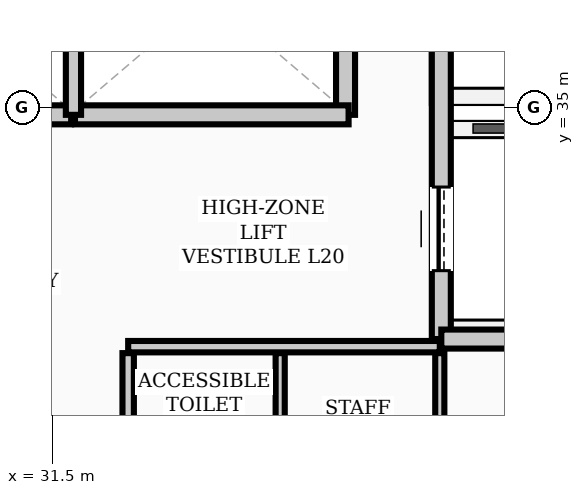
"""IFC4 building model, lengths in metres.
Left out: names, types, materials, properties, quantities, classifications, styles, units other than length and angle.
Written with IfcOpenShell. Run it as: python <this file> out.ifc"""

import sys

from ifc_helpers import new_model, si_unit, direction, frame, frame_2d, origin, place, context, subcontext, project, spatial, rectangle, extrude, element, fill, save


model = new_model("IFC4")
c1 = context("Model", 3, precision=1e-05, world=origin(), true_north=direction((0.0, 1.0)))
c2 = subcontext(c1, "Body", "Model", "MODEL_VIEW")
j1 = project(units=[si_unit("LENGTHUNIT", "METRE"), si_unit("PLANEANGLEUNIT", "RADIAN")], contexts=[c1])
p1 = place(None, origin())
s1 = spatial("IfcSite", under=j1, at=p1, CompositionType="ELEMENT")
p2 = place(p1, origin())
s2 = spatial("IfcBuilding", under=s1, at=p2, CompositionType="ELEMENT")
p3 = place(p2, frame((0.0, 0.0, 81.1)))
s3 = spatial("IfcBuildingStorey", under=s2, at=p3, CompositionType="ELEMENT", Elevation=81.1)
p4 = place(p3, frame((36.62, 31.95, 0.0), z_axis=(0.0, 0.0, 1.0), x_axis=(0.0, 1.0, 0.0)))
e1 = element("IfcWall", 1, at=p4, inside=s3, PredefinedType="STANDARD", context=c2, shape_type="SweptSolid", body=[
    extrude(rectangle(XDim=6.0, YDim=0.25, at=frame_2d((3.0, 0.0))), origin(), (0.0, 0.0, 1.0), 3.3),
])
p5 = place(p4, frame((0.9, 0.0, 0.0)))
e2 = element("IfcOpeningElement", 2, at=p5, cuts=e1, PredefinedType="OPENING", context=c2, shape_type="SweptSolid", body=[
    extrude(rectangle(XDim=1.1, YDim=2.08, at=frame_2d((0.55, 1.04))), frame((0.0, 0.135, 0.0), z_axis=(0.0, -1.0, 0.0), x_axis=(1.0, 0.0, 0.0)), (0.0, 0.0, 1.0), 0.27),
])
p6 = place(p4, frame((4.0, 0.0, 0.0)))
e3 = element("IfcOpeningElement", 3, at=p6, cuts=e1, PredefinedType="OPENING", context=c2, shape_type="SweptSolid", body=[
    extrude(rectangle(XDim=1.1, YDim=2.08, at=frame_2d((0.55, 1.04))), frame((0.0, 0.135, 0.0), z_axis=(0.0, -1.0, 0.0), x_axis=(1.0, 0.0, 0.0)), (0.0, 0.0, 1.0), 0.27),
])
p7 = place(p3, frame((36.62, 31.95, 0.0), z_axis=(0.0, 0.0, 1.0), x_axis=(1.0, 0.0, 0.0)))
e4 = element("IfcWall", 4, at=p7, inside=s3, PredefinedType="STANDARD", context=c2, shape_type="SweptSolid", body=[
    extrude(rectangle(XDim=1.9, YDim=0.25, at=frame_2d((0.95, 0.0))), origin(), (0.0, 0.0, 1.0), 3.48),
])
p8 = place(p3, frame((35.36, 34.9, 0.0), z_axis=(0.0, 0.0, 1.0), x_axis=(0.0, 1.0, 0.0)))
e5 = element("IfcWall", 5, at=p8, inside=s3, PredefinedType="STANDARD", context=c2, shape_type="SweptSolid", body=[
    extrude(rectangle(XDim=3.05, YDim=0.25, at=frame_2d((1.525, 0.0))), origin(), (0.0, 0.0, 1.0), 3.3),
])
p9 = place(p3, frame((28.2, 34.9, 0.0), z_axis=(0.0, 0.0, 1.0), x_axis=(1.0, 0.0, 0.0)))
e6 = element("IfcWall", 6, at=p9, inside=s3, PredefinedType="STANDARD", context=c2, shape_type="SweptSolid", body=[
    extrude(rectangle(XDim=3.55, YDim=0.25, at=frame_2d((1.775, 0.0))), origin(), (0.0, 0.0, 1.0), 3.72),
])
p10 = place(p3, frame((31.8, 34.9, 0.0), z_axis=(0.0, 0.0, 1.0), x_axis=(1.0, 0.0, 0.0)))
e7 = element("IfcWall", 7, at=p10, inside=s3, PredefinedType="STANDARD", context=c2, shape_type="SweptSolid", body=[
    extrude(rectangle(XDim=3.6, YDim=0.25, at=frame_2d((1.8, 0.0))), origin(), (0.0, 0.0, 1.0), 3.72),
])
p11 = place(p3, frame((32.5, 31.85, 0.0), z_axis=(0.0, 0.0, 1.0), x_axis=(1.0, 0.0, 0.0)))
e8 = element("IfcWall", 8, at=p11, inside=s3, PredefinedType="PARTITIONING", context=c2, shape_type="SweptSolid", body=[
    extrude(rectangle(XDim=4.1, YDim=0.15, at=frame_2d((2.05, 0.0))), origin(), (0.0, 0.0, 1.0), 3.72),
])
p12 = place(p3, frame((32.5, 29.285, 0.0), z_axis=(0.0, 0.0, 1.0), x_axis=(0.0, 1.0, 0.0)))
e9 = element("IfcWall", 9, at=p12, inside=s3, PredefinedType="PARTITIONING", context=c2, shape_type="SweptSolid", body=[
    extrude(rectangle(XDim=2.48, YDim=0.15, at=frame_2d((1.24, 0.0))), origin(), (0.0, 0.0, 1.0), 3.3),
])
for number, where, z_axis, x_axis in (
    (10, (36.6, 29.285, 0.0), (0.0, 0.0, 1.0), (0.0, 1.0, 0.0)),
    (11, (34.5, 29.285, 0.0), (0.0, 0.0, 1.0), (0.0, 1.0, 0.0)),
):
    element("IfcWall", number, at=place(p3, frame(where, z_axis=z_axis, x_axis=x_axis)), inside=s3, PredefinedType="PARTITIONING", context=c2, shape_type="SweptSolid", body=[
        extrude(rectangle(XDim=2.48, YDim=0.12, at=frame_2d((1.24, 0.0))), origin(), (0.0, 0.0, 1.0), 3.3),
    ])
p13 = place(p3, frame((31.78, 34.9, 0.0), z_axis=(0.0, 0.0, 1.0), x_axis=(0.0, 1.0, 0.0)))
e12 = element("IfcWall", 12, at=p13, inside=s3, PredefinedType="STANDARD", context=c2, shape_type="SweptSolid", body=[
    extrude(rectangle(XDim=3.12, YDim=0.2, at=frame_2d((1.56, 0.0))), origin(), (0.0, 0.0, 1.0), 3.3),
])
p14 = place(p5, origin())
e13 = element("IfcDoor", 13, at=p14, inside=s3, OperationType="SLIDING_TO_LEFT", PredefinedType="DOOR", context=c2, shape_type="SweptSolid", body=[
    extrude(rectangle(XDim=1.1, YDim=2.08, at=frame_2d((0.55, 1.04))), frame((0.0, 0.025, 0.0), z_axis=(0.0, -1.0, 0.0), x_axis=(1.0, 0.0, 0.0)), (0.0, 0.0, 1.0), 0.05),
])
fill(e2, e13)
save(model, sys.argv[1])
